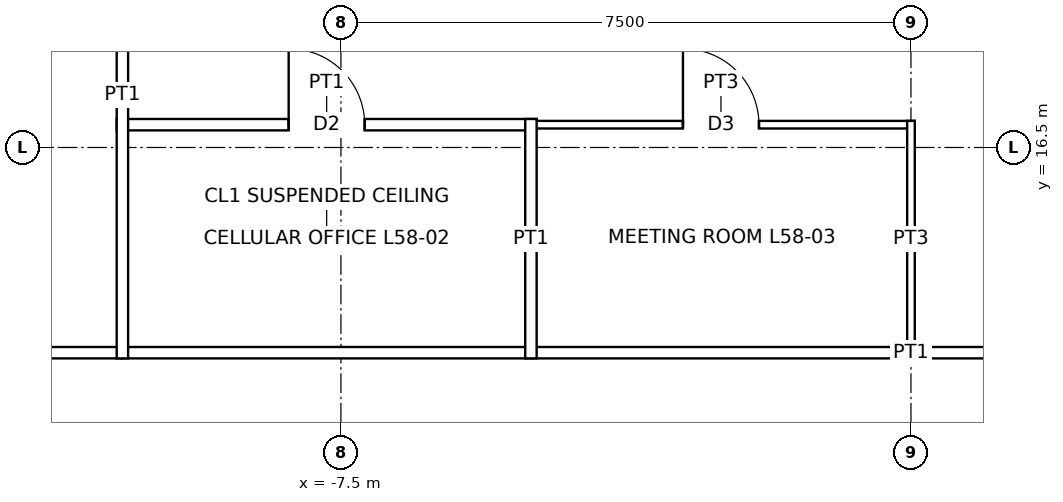
"""IFC4 building model, lengths in metres.
Left out: names, types, materials, properties, quantities, classifications, styles, units other than length and angle.
Written with IfcOpenShell. Run it as: python <this file> out.ifc"""

import sys

from ifc_helpers import new_model, si_unit, direction, frame, frame_2d, origin, place, context, subcontext, project, spatial, rectangle, extrude, element, fill, save


model = new_model("IFC4")
c1 = context("Model", 3, precision=1e-05, world=origin(), true_north=direction((0.0, 1.0)))
c2 = subcontext(c1, "Body", "Model", "MODEL_VIEW")
j1 = project(units=[si_unit("LENGTHUNIT", "METRE"), si_unit("PLANEANGLEUNIT", "RADIAN")], contexts=[c1])
p1 = place(None, origin())
s1 = spatial("IfcSite", under=j1, at=p1, CompositionType="ELEMENT")
p2 = place(p1, origin())
s2 = spatial("IfcBuilding", under=s1, at=p2, CompositionType="ELEMENT")
p3 = place(p2, frame((0.0, 0.0, 267.9)))
s3 = spatial("IfcBuildingStorey", under=s2, at=p3, CompositionType="ELEMENT", Elevation=267.9)
p4 = place(p3, frame((-13.875, 13.8, 0.0), z_axis=(0.0, 0.0, 1.0), x_axis=(1.0, 0.0, 0.0)))
e1 = element("IfcWall", 1, at=p4, inside=s3, PredefinedType="PARTITIONING", context=c2, shape_type="SweptSolid", body=[
    extrude(rectangle(XDim=27.75, YDim=0.15, at=frame_2d((13.875, 0.0))), origin(), (0.0, 0.0, 1.0), 3.85),
])
p5 = place(p4, frame((20.275, 0.0, 0.0)))
e2 = element("IfcOpeningElement", 2, at=p5, cuts=e1, PredefinedType="OPENING", context=c2, shape_type="SweptSolid", body=[
    extrude(rectangle(XDim=1.0, YDim=2.4, at=frame_2d((0.5, 1.2))), frame((0.0, 0.085, 0.0), z_axis=(0.0, -1.0, 0.0), x_axis=(1.0, 0.0, 0.0)), (0.0, 0.0, 1.0), 0.17),
])
p6 = place(p3, frame((-10.45, 16.8, 0.0), z_axis=(0.0, 0.0, 1.0), x_axis=(1.0, 0.0, 0.0)))
e3 = element("IfcWall", 3, at=p6, inside=s3, PredefinedType="PARTITIONING", context=c2, shape_type="SweptSolid", body=[
    extrude(rectangle(XDim=5.525, YDim=0.15, at=frame_2d((2.762, 0.0))), origin(), (0.0, 0.0, 1.0), 3.85),
])
p7 = place(p6, frame((2.262, 0.0, 0.0)))
e4 = element("IfcOpeningElement", 4, at=p7, cuts=e3, PredefinedType="OPENING", context=c2, shape_type="SweptSolid", body=[
    extrude(rectangle(XDim=1.0, YDim=2.1, at=frame_2d((0.5, 1.05))), frame((0.0, 0.085, 0.0), z_axis=(0.0, -1.0, 0.0), x_axis=(1.0, 0.0, 0.0)), (0.0, 0.0, 1.0), 0.17),
])
p8 = place(p3, frame((-5.05, 16.8, 0.0), z_axis=(0.0, 0.0, 1.0), x_axis=(1.0, 0.0, 0.0)))
e5 = element("IfcWall", 5, at=p8, inside=s3, PredefinedType="PARTITIONING", context=c2, shape_type="SweptSolid", body=[
    extrude(rectangle(XDim=5.1, YDim=0.1, at=frame_2d((2.55, 0.0))), origin(), (0.0, 0.0, 1.0), 3.85),
])
p9 = place(p8, frame((2.05, 0.0, 0.0)))
e6 = element("IfcOpeningElement", 6, at=p9, cuts=e5, PredefinedType="OPENING", context=c2, shape_type="SweptSolid", body=[
    extrude(rectangle(XDim=1.0, YDim=2.1, at=frame_2d((0.5, 1.05))), frame((0.0, 0.06, 0.0), z_axis=(0.0, -1.0, 0.0), x_axis=(1.0, 0.0, 0.0)), (0.0, 0.0, 1.0), 0.12),
])
p10 = place(p3, frame((-10.375, 13.725, 0.0), z_axis=(0.0, 0.0, 1.0), x_axis=(0.0, 1.0, 0.0)))
e7 = element("IfcWall", 7, at=p10, inside=s3, PredefinedType="PARTITIONING", context=c2, shape_type="SweptSolid", body=[
    extrude(rectangle(XDim=6.925, YDim=0.15, at=frame_2d((3.462, 0.0))), origin(), (0.0, 0.0, 1.0), 3.85),
])
p11 = place(p3, frame((-5.0, 13.725, 0.0), z_axis=(0.0, 0.0, 1.0), x_axis=(0.0, 1.0, 0.0)))
e8 = element("IfcWall", 8, at=p11, inside=s3, PredefinedType="PARTITIONING", context=c2, shape_type="SweptSolid", body=[
    extrude(rectangle(XDim=3.15, YDim=0.15, at=frame_2d((1.575, 0.0))), origin(), (0.0, 0.0, 1.0), 3.85),
])
p12 = place(p3, frame((0.0, 13.75, 0.0), z_axis=(0.0, 0.0, 1.0), x_axis=(0.0, 1.0, 0.0)))
e9 = element("IfcWall", 9, at=p12, inside=s3, PredefinedType="PARTITIONING", context=c2, shape_type="SweptSolid", body=[
    extrude(rectangle(XDim=3.1, YDim=0.1, at=frame_2d((1.55, 0.0))), origin(), (0.0, 0.0, 1.0), 3.243),
])
p13 = place(p7, origin())
e10 = element("IfcDoor", 10, at=p13, inside=s3, OperationType="SINGLE_SWING_LEFT", PredefinedType="DOOR", context=c2, shape_type="SweptSolid", body=[
    extrude(rectangle(XDim=1.0, YDim=2.1, at=frame_2d((0.5, 1.05))), frame((0.0, 0.025, 0.0), z_axis=(0.0, -1.0, 0.0), x_axis=(1.0, 0.0, 0.0)), (0.0, 0.0, 1.0), 0.05),
])
fill(e4, e10)
p14 = place(p9, origin())
e11 = element("IfcDoor", 11, at=p14, inside=s3, OperationType="SINGLE_SWING_LEFT", PredefinedType="DOOR", context=c2, shape_type="SweptSolid", body=[
    extrude(rectangle(XDim=1.0, YDim=2.1, at=frame_2d((0.5, 1.05))), frame((0.0, 0.025, 0.0), z_axis=(0.0, -1.0, 0.0), x_axis=(1.0, 0.0, 0.0)), (0.0, 0.0, 1.0), 0.05),
])
fill(e6, e11)
save(model, sys.argv[1])
